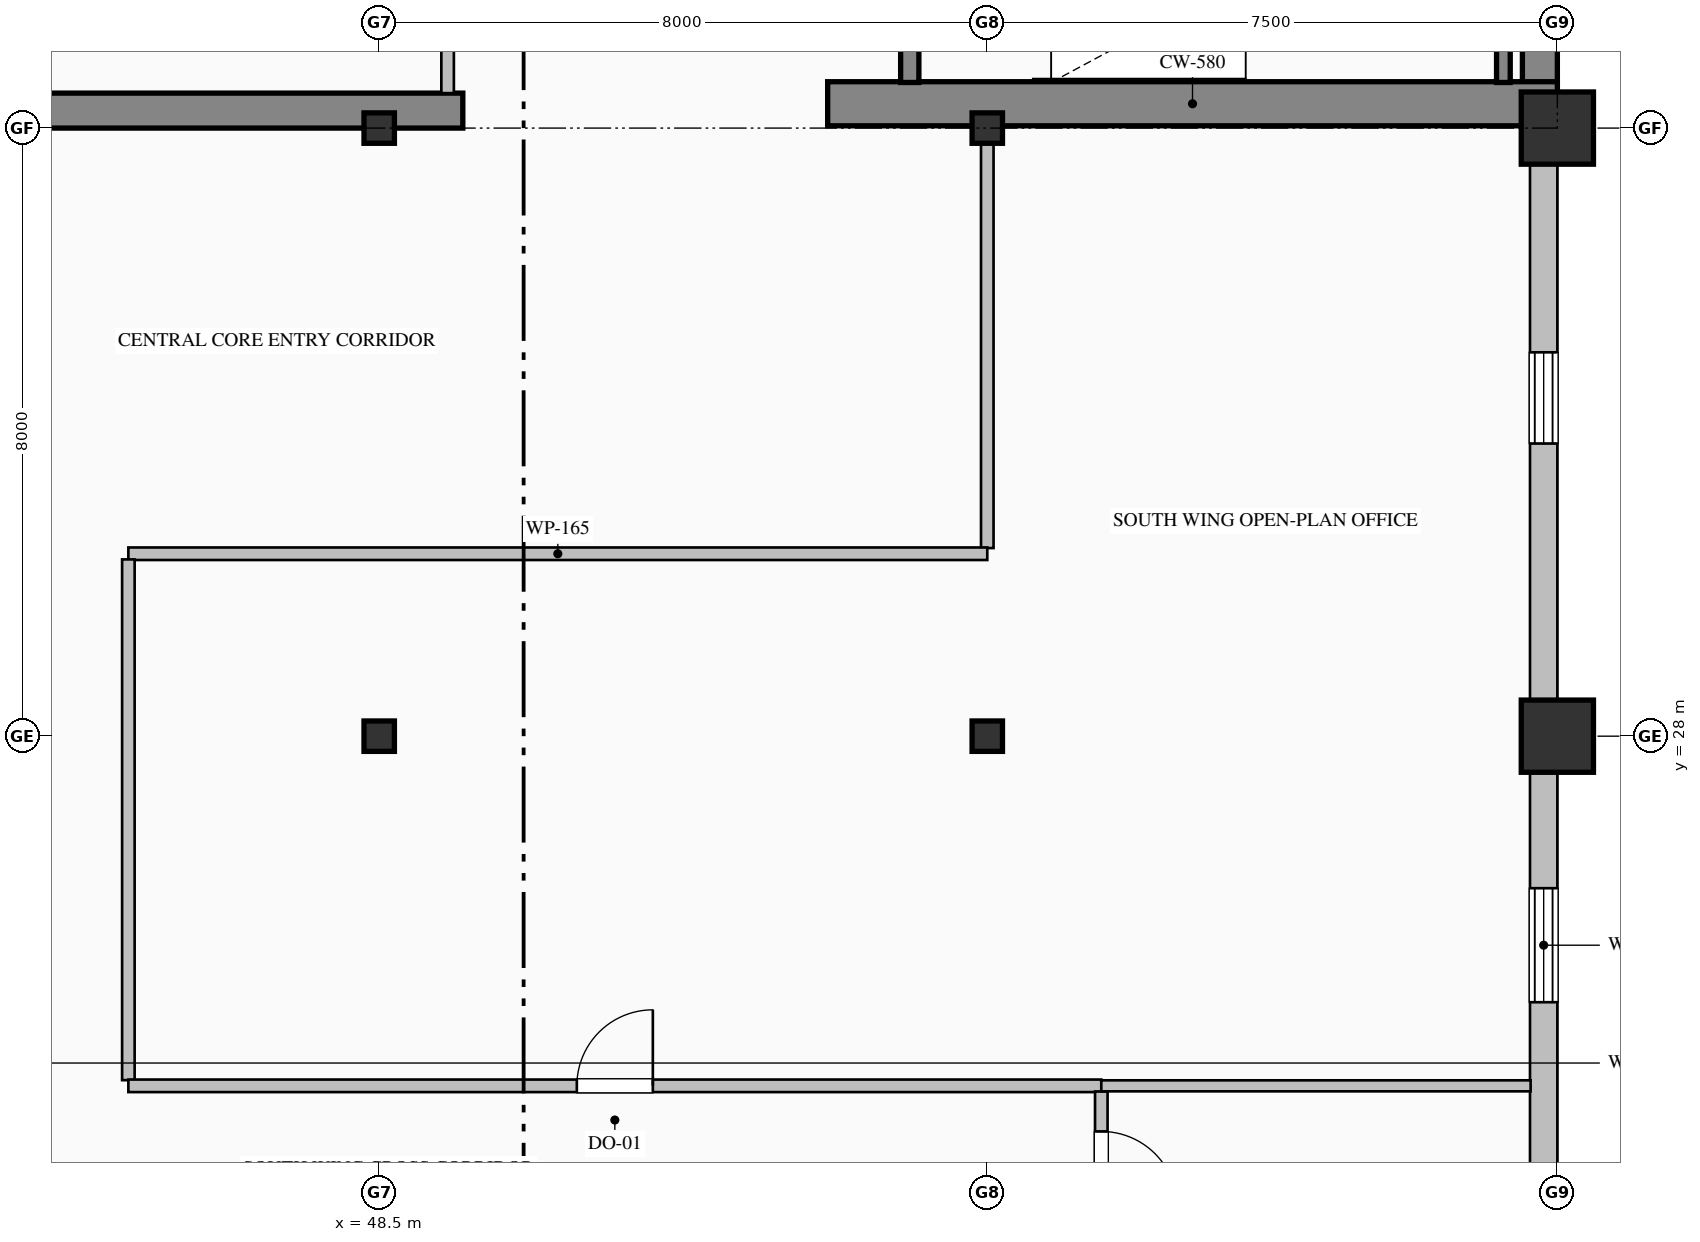
"""IFC4 building model, lengths in metres.
Left out: names, types, materials, properties, quantities, classifications, styles, units other than length and angle.
Written with IfcOpenShell. Run it as: python <this file> out.ifc"""

import sys

from ifc_helpers import new_model, si_unit, direction, frame, frame_2d, origin, origin_2d, place, context, subcontext, project, spatial, rectangle, hollow_rectangle, i_section, extrude, element, fill, save


model = new_model("IFC4")
c1 = context("Model", 3, precision=1e-05, world=origin(), true_north=direction((0.0, 1.0)))
c2 = subcontext(c1, "Body", "Model", "MODEL_VIEW")
j1 = project(units=[si_unit("LENGTHUNIT", "METRE"), si_unit("PLANEANGLEUNIT", "RADIAN")], contexts=[c1])
p1 = place(None, origin())
s1 = spatial("IfcSite", under=j1, at=p1, CompositionType="ELEMENT")
p2 = place(p1, origin())
s2 = spatial("IfcBuilding", under=s1, at=p2, CompositionType="ELEMENT")
p3 = place(p2, frame((0.0, 0.0, 225.8)))
s3 = spatial("IfcBuildingStorey", under=s2, at=p3, CompositionType="ELEMENT", Elevation=225.8)
p4 = place(p3, frame((63.77, 36.32, 0.0), z_axis=(0.0, 0.0, 1.0), x_axis=(0.0, 1.0, 0.0)))
e1 = element("IfcWall", 1, at=p4, inside=s3, PredefinedType="SHEAR", context=c2, shape_type="SweptSolid", body=[
    extrude(rectangle(XDim=15.22, YDim=0.46, at=frame_2d((7.61, 0.0))), origin(), (0.0, 0.0, 1.0), 3.775),
])
p5 = place(p3, frame((40.5, 36.23, 0.0), z_axis=(0.0, 0.0, 1.0), x_axis=(1.0, 0.0, 0.0)))
e2 = element("IfcWall", 2, at=p5, inside=s3, PredefinedType="SHEAR", context=c2, shape_type="SweptSolid", body=[
    extrude(rectangle(XDim=9.1, YDim=0.46, at=frame_2d((4.55, 0.0))), origin(), (0.0, 0.0, 1.0), 3.775),
])
p6 = place(p3, frame((54.4, 36.32, 0.0), z_axis=(0.0, 0.0, 1.0), x_axis=(1.0, 0.0, 0.0)))
e3 = element("IfcWall", 3, at=p6, inside=s3, PredefinedType="SHEAR", context=c2, shape_type="SweptSolid", body=[
    extrude(rectangle(XDim=9.6, YDim=0.58, at=frame_2d((4.8, 0.0))), origin(), (0.0, 0.0, 1.0), 4.0),
])
for number, where, z_axis, x_axis in (
    (4, (48.5, 28.0, 0.0), (0.0, 0.0, 1.0), (1.0, 0.0, 0.0)),
    (5, (48.5, 36.0, 0.0), (0.0, 0.0, 1.0), (1.0, 0.0, 0.0)),
    (6, (56.5, 28.0, 0.0), (0.0, 0.0, 1.0), (1.0, 0.0, 0.0)),
    (7, (56.5, 36.0, 0.0), (0.0, 0.0, 1.0), (1.0, 0.0, 0.0)),
):
    element("IfcColumn", number, at=place(p3, frame(where, z_axis=z_axis, x_axis=x_axis)), inside=s3, PredefinedType="COLUMN", context=c2, shape_type="SweptSolid", body=[
        extrude(i_section(OverallWidth=0.4, OverallDepth=0.4, WebThickness=0.013, FlangeThickness=0.021, FilletRadius=0.022, at=origin_2d()), origin(), (0.0, 0.0, 1.0), 4.0),
    ])
for number, where, z_axis, x_axis in (
    (8, (64.0, 28.0, 0.0), (0.0, 0.0, 1.0), (1.0, 0.0, 0.0)),
    (9, (64.0, 36.0, 0.0), (0.0, 0.0, 1.0), (1.0, 0.0, 0.0)),
):
    element("IfcColumn", number, at=place(p3, frame(where, z_axis=z_axis, x_axis=x_axis)), inside=s3, PredefinedType="COLUMN", context=c2, shape_type="SweptSolid", body=[
        extrude(hollow_rectangle(XDim=0.95, YDim=0.95, WallThickness=0.036, at=origin_2d()), origin(), (0.0, 0.0, 1.0), 4.0),
    ])
p7 = place(p3, frame((63.82, 36.05, 0.0), z_axis=(0.0, 0.0, 1.0), x_axis=(0.0, -1.0, 0.0)))
e10 = element("IfcWall", 10, at=p7, inside=s3, PredefinedType="SOLIDWALL", context=c2, shape_type="SweptSolid", body=[
    extrude(rectangle(XDim=19.55, YDim=0.36, at=frame_2d((9.775, 0.0))), origin(), (0.0, 0.0, 1.0), 3.325),
])
p8 = place(p7, frame((3.0, 0.0, 0.9)))
e11 = element("IfcOpeningElement", 11, at=p8, cuts=e10, PredefinedType="OPENING", context=c2, shape_type="SweptSolid", body=[
    extrude(rectangle(XDim=1.2, YDim=1.85, at=frame_2d((0.6, 0.925))), frame((0.0, 0.19, 0.0), z_axis=(0.0, -1.0, 0.0), x_axis=(1.0, 0.0, 0.0)), (0.0, 0.0, 1.0), 0.38),
])
p9 = place(p7, frame((10.05, 0.0, 0.7)))
e12 = element("IfcOpeningElement", 12, at=p9, cuts=e10, PredefinedType="OPENING", context=c2, shape_type="SweptSolid", body=[
    extrude(rectangle(XDim=1.5, YDim=2.4, at=frame_2d((0.75, 1.2))), frame((0.0, 0.19, 0.0), z_axis=(0.0, -1.0, 0.0), x_axis=(1.0, 0.0, 0.0)), (0.0, 0.0, 1.0), 0.38),
])
p10 = place(p7, frame((13.8, 0.0, 0.9)))
e13 = element("IfcOpeningElement", 13, at=p10, cuts=e10, PredefinedType="OPENING", context=c2, shape_type="SweptSolid", body=[
    extrude(rectangle(XDim=1.2, YDim=1.85, at=frame_2d((0.6, 0.925))), frame((0.0, 0.19, 0.0), z_axis=(0.0, -1.0, 0.0), x_axis=(1.0, 0.0, 0.0)), (0.0, 0.0, 1.0), 0.38),
])
p11 = place(p3, frame((55.48, 39.75, 0.0), z_axis=(0.0, 0.0, 1.0), x_axis=(0.0, -1.0, 0.0)))
e14 = element("IfcWall", 14, at=p11, inside=s3, PredefinedType="SOLIDWALL", context=c2, shape_type="SweptSolid", body=[
    extrude(rectangle(XDim=3.15, YDim=0.24, at=frame_2d((1.575, 0.0))), origin(), (0.0, 0.0, 1.0), 4.0),
])
p12 = place(p11, frame((1.0, 0.0, 0.0)))
e15 = element("IfcOpeningElement", 15, at=p12, cuts=e14, PredefinedType="OPENING", context=c2, shape_type="SweptSolid", body=[
    extrude(rectangle(XDim=1.15, YDim=2.2, at=frame_2d((0.575, 1.1))), frame((0.0, 0.13, 0.0), z_axis=(0.0, -1.0, 0.0), x_axis=(1.0, 0.0, 0.0)), (0.0, 0.0, 1.0), 0.26),
])
p13 = place(p3, frame((63.29, 36.6, 0.0), z_axis=(0.0, 0.0, 1.0), x_axis=(0.0, 1.0, 0.0)))
e16 = element("IfcWall", 16, at=p13, inside=s3, PredefinedType="SOLIDWALL", context=c2, shape_type="SweptSolid", body=[
    extrude(rectangle(XDim=3.15, YDim=0.18, at=frame_2d((1.575, 0.0))), origin(), (0.0, 0.0, 1.0), 4.0),
])
p14 = place(p3, frame((49.4, 36.46, 0.0), z_axis=(0.0, 0.0, 1.0), x_axis=(0.0, 1.0, 0.0)))
e17 = element("IfcWall", 17, at=p14, inside=s3, PredefinedType="PARTITIONING", context=c2, shape_type="SweptSolid", body=[
    extrude(rectangle(XDim=3.853, YDim=0.165, at=frame_2d((1.927, 0.0))), origin(), (0.0, 0.0, 1.0), 3.017),
])
p15 = place(p14, frame((1.477, 0.0, 0.0)))
e18 = element("IfcOpeningElement", 18, at=p15, cuts=e17, PredefinedType="OPENING", context=c2, shape_type="SweptSolid", body=[
    extrude(rectangle(XDim=0.9, YDim=2.15, at=frame_2d((0.45, 1.075))), frame((0.0, 0.093, 0.0), z_axis=(0.0, -1.0, 0.0), x_axis=(1.0, 0.0, 0.0)), (0.0, 0.0, 1.0), 0.185),
])
p16 = place(p3, frame((56.5, 36.0, 0.0), z_axis=(0.0, 0.0, 1.0), x_axis=(0.0, -1.0, 0.0)))
e19 = element("IfcWall", 19, at=p16, inside=s3, PredefinedType="PARTITIONING", context=c2, shape_type="SweptSolid", body=[
    extrude(rectangle(XDim=5.525, YDim=0.165, at=frame_2d((2.763, 0.0))), origin(), (0.0, 0.0, 1.0), 3.179),
])
p17 = place(p3, frame((56.5, 30.4, 0.0), z_axis=(0.0, 0.0, 1.0), x_axis=(-1.0, 0.0, 0.0)))
e20 = element("IfcWall", 20, at=p17, inside=s3, PredefinedType="PARTITIONING", context=c2, shape_type="SweptSolid", body=[
    extrude(rectangle(XDim=11.3, YDim=0.165, at=frame_2d((5.65, 0.0))), origin(), (0.0, 0.0, 1.0), 3.775),
])
p18 = place(p3, frame((45.2, 30.325, 0.0), z_axis=(0.0, 0.0, 1.0), x_axis=(0.0, -1.0, 0.0)))
e21 = element("IfcWall", 21, at=p18, inside=s3, PredefinedType="PARTITIONING", context=c2, shape_type="SweptSolid", body=[
    extrude(rectangle(XDim=6.851, YDim=0.165, at=frame_2d((3.425, 0.0))), origin(), (0.0, 0.0, 1.0), 3.775),
])
p19 = place(p3, frame((45.2, 23.4, 0.0), z_axis=(0.0, 0.0, 1.0), x_axis=(1.0, 0.0, 0.0)))
e22 = element("IfcWall", 22, at=p19, inside=s3, PredefinedType="PARTITIONING", context=c2, shape_type="SweptSolid", body=[
    extrude(rectangle(XDim=12.8, YDim=0.165, at=frame_2d((6.4, 0.0))), origin(), (0.0, 0.0, 1.0), 3.467),
])
p20 = place(p19, frame((5.9, 0.0, 0.0)))
e23 = element("IfcOpeningElement", 23, at=p20, cuts=e22, PredefinedType="OPENING", context=c2, shape_type="SweptSolid", body=[
    extrude(rectangle(XDim=1.0, YDim=2.15, at=frame_2d((0.5, 1.075))), frame((0.0, 0.093, 0.0), z_axis=(0.0, -1.0, 0.0), x_axis=(1.0, 0.0, 0.0)), (0.0, 0.0, 1.0), 0.185),
])
p21 = place(p3, frame((58.0, 23.325, 0.0), z_axis=(0.0, 0.0, 1.0), x_axis=(0.0, -1.0, 0.0)))
e24 = element("IfcWall", 24, at=p21, inside=s3, PredefinedType="PARTITIONING", context=c2, shape_type="SweptSolid", body=[
    extrude(rectangle(XDim=2.051, YDim=0.165, at=frame_2d((1.025, 0.0))), origin(), (0.0, 0.0, 1.0), 3.775),
])
p22 = place(p21, frame((0.525, 0.0, 0.0)))
e25 = element("IfcOpeningElement", 25, at=p22, cuts=e24, PredefinedType="OPENING", context=c2, shape_type="SweptSolid", body=[
    extrude(rectangle(XDim=1.0, YDim=2.15, at=frame_2d((0.5, 1.075))), frame((0.0, 0.093, 0.0), z_axis=(0.0, -1.0, 0.0), x_axis=(1.0, 0.0, 0.0)), (0.0, 0.0, 1.0), 0.185),
])
p23 = place(p3, frame((63.648, 23.4, 0.0), z_axis=(0.0, 0.0, 1.0), x_axis=(-1.0, 0.0, 0.0)))
e26 = element("IfcWall", 26, at=p23, inside=s3, PredefinedType="PARTITIONING", context=c2, shape_type="SweptSolid", body=[
    extrude(rectangle(XDim=5.648, YDim=0.145, at=frame_2d((2.824, 0.0))), origin(), (0.0, 0.0, 1.0), 3.775),
])
p24 = place(p8, origin())
e27 = element("IfcWindow", 27, at=p24, inside=s3, PartitioningType="DOUBLE_PANEL_VERTICAL", PredefinedType="WINDOW", context=c2, shape_type="SweptSolid", body=[
    extrude(rectangle(XDim=1.2, YDim=1.85, at=frame_2d((0.6, 0.925))), frame((0.0, 0.15, 0.0), z_axis=(0.0, -1.0, 0.0), x_axis=(1.0, 0.0, 0.0)), (0.0, 0.0, 1.0), 0.06),
])
fill(e11, e27)
p25 = place(p9, origin())
e28 = element("IfcWindow", 28, at=p25, inside=s3, PartitioningType="DOUBLE_PANEL_HORIZONTAL", PredefinedType="WINDOW", context=c2, shape_type="SweptSolid", body=[
    extrude(rectangle(XDim=1.5, YDim=2.4, at=frame_2d((0.75, 1.2))), frame((0.0, 0.15, 0.0), z_axis=(0.0, -1.0, 0.0), x_axis=(1.0, 0.0, 0.0)), (0.0, 0.0, 1.0), 0.06),
])
fill(e12, e28)
p26 = place(p20, origin())
e29 = element("IfcDoor", 29, at=p26, inside=s3, OperationType="SINGLE_SWING_RIGHT", PredefinedType="DOOR", context=c2, shape_type="SweptSolid", body=[
    extrude(rectangle(XDim=1.0, YDim=2.15, at=frame_2d((0.5, 1.075))), frame((0.0, 0.025, 0.0), z_axis=(0.0, -1.0, 0.0), x_axis=(1.0, 0.0, 0.0)), (0.0, 0.0, 1.0), 0.05),
])
fill(e23, e29)
p27 = place(p22, origin())
e30 = element("IfcDoor", 30, at=p27, inside=s3, OperationType="SINGLE_SWING_RIGHT", PredefinedType="DOOR", context=c2, shape_type="SweptSolid", body=[
    extrude(rectangle(XDim=1.0, YDim=2.15, at=frame_2d((0.5, 1.075))), frame((0.0, 0.025, 0.0), z_axis=(0.0, -1.0, 0.0), x_axis=(1.0, 0.0, 0.0)), (0.0, 0.0, 1.0), 0.05),
])
fill(e25, e30)
save(model, sys.argv[1])
